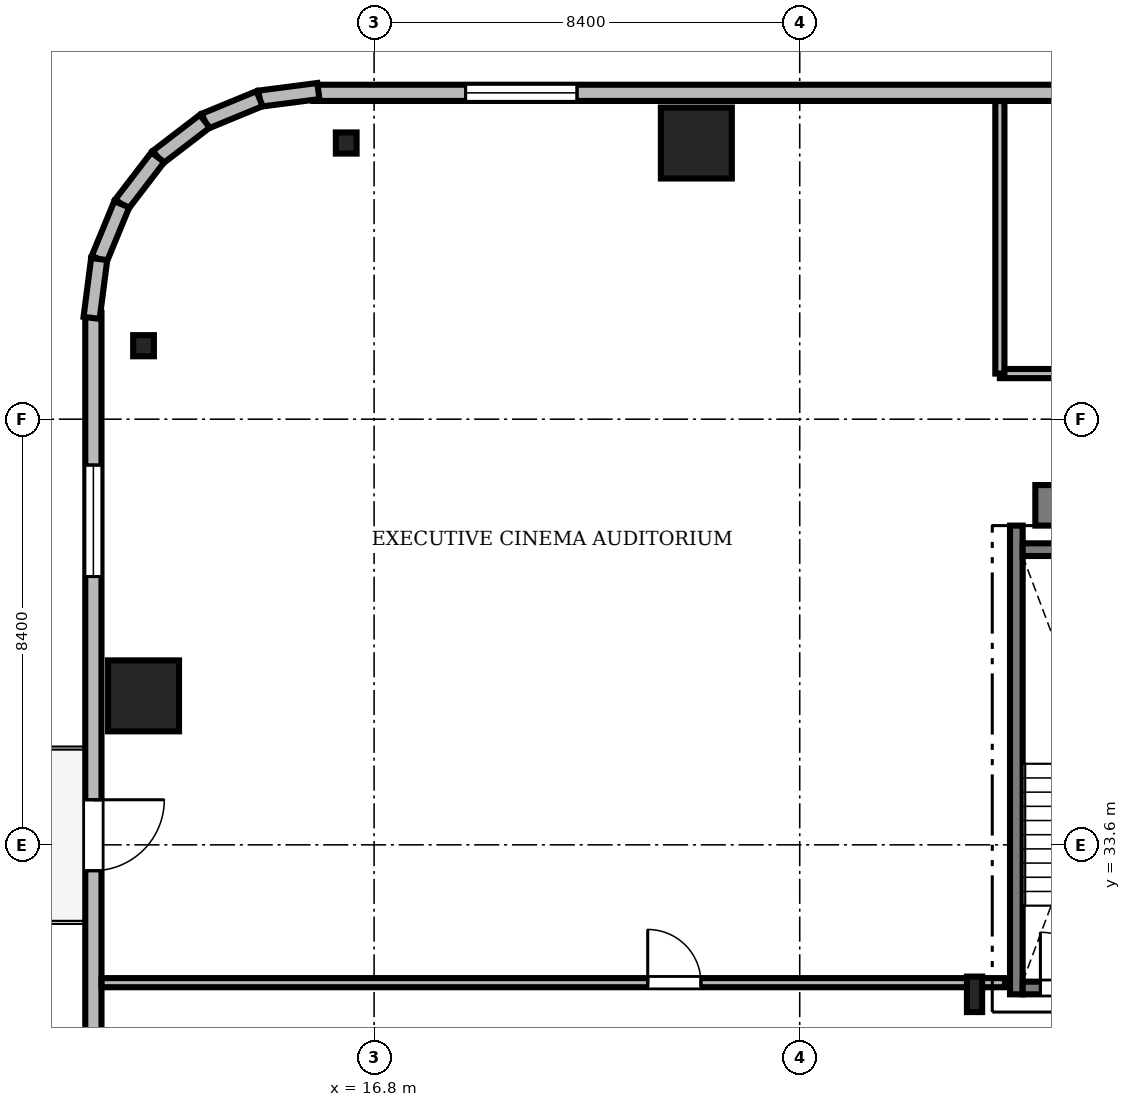
"""IFC4 building model, lengths in metres.
Left out: names, types, materials, properties, quantities, classifications, styles, units other than length and angle.
Written with IfcOpenShell. Run it as: python <this file> out.ifc"""

import sys

from ifc_helpers import new_model, si_unit, direction, frame, frame_2d, origin, origin_2d, place, context, subcontext, project, spatial, rectangle, i_section, extrude, source, transform, mapped, element, fill, save


model = new_model("IFC4")
c1 = context("Model", 3, precision=1e-05, world=origin(), true_north=direction((0.0, 1.0)))
c2 = subcontext(c1, "Body", "Model", "MODEL_VIEW")
j1 = project(units=[si_unit("LENGTHUNIT", "METRE"), si_unit("PLANEANGLEUNIT", "RADIAN")], contexts=[c1])
p1 = place(None, origin())
s1 = spatial("IfcSite", under=j1, at=p1, CompositionType="ELEMENT")
p2 = place(p1, origin())
s2 = spatial("IfcBuilding", under=s1, at=p2, CompositionType="ELEMENT")
p3 = place(p2, frame((0.0, 0.0, 184.8)))
s3 = spatial("IfcBuildingStorey", under=s2, at=p3, CompositionType="ELEMENT", Elevation=184.8)
m1 = source(origin(), c2, "Body", "SweptSolid", [
    extrude(rectangle(XDim=17.52, YDim=0.8, at=frame_2d((8.76, 0.0))), origin(), (0.0, 0.0, 1.0), 3.53),
])
p4 = place(p3, frame((29.85, 40.3, 0.0), z_axis=(0.0, 0.0, 1.0), x_axis=(1.0, 0.0, 0.0)))
e1 = element("IfcWall", 1, at=p4, inside=s3, PredefinedType="SHEAR", context=c2, shape_type="MappedRepresentation", body=[
    mapped(m1, transform((0.0, 0.0, 0.0), scale=1.0)),
])
m2 = source(origin(), c2, "Body", "SweptSolid", [
    extrude(i_section(OverallWidth=0.3, OverallDepth=0.7, WebThickness=0.017, FlangeThickness=0.032, FilletRadius=0.027, at=origin_2d()), origin(), (0.0, 0.0, 1.0), 3.53),
])
p5 = place(p3, frame((28.65, 30.65, 0.0), z_axis=(0.0, 0.0, 1.0), x_axis=(1.0, 0.0, 0.0)))
e2 = element("IfcColumn", 2, at=p5, inside=s3, PredefinedType="COLUMN", context=c2, shape_type="MappedRepresentation", body=[
    mapped(m2, transform((0.0, 0.0, 0.0), scale=1.0)),
])
m3 = source(origin(), c2, "Body", "SweptSolid", [
    extrude(rectangle(XDim=1.4, YDim=1.4, at=origin_2d()), origin(), (0.0, 0.0, 1.0), 3.53),
])
for number, where, z_axis, x_axis in (
    (3, (23.16, 47.45, 0.0), (0.0, 0.0, 1.0), (1.0, 0.0, 0.0)),
    (4, (12.25, 36.54, 0.0), (0.0, 0.0, 1.0), (1.0, 0.0, 0.0)),
):
    element("IfcColumn", number, at=place(p3, frame(where, z_axis=z_axis, x_axis=x_axis)), inside=s3, PredefinedType="COLUMN", context=c2, shape_type="MappedRepresentation", body=[
        mapped(m3, transform((0.0, 0.0, 0.0), scale=1.0)),
    ])
m4 = source(origin(), c2, "Body", "SweptSolid", [
    extrude(i_section(OverallWidth=0.409, OverallDepth=0.417, WebThickness=0.021, FlangeThickness=0.033, FilletRadius=0.015, at=origin_2d()), origin(), (0.0, 0.0, 1.0), 3.53),
])
for number, where, z_axis, x_axis in (
    (5, (16.25, 47.45, 0.0), (0.0, 0.0, 1.0), (1.0, 0.0, 0.0)),
    (6, (12.25, 43.45, 0.0), (0.0, 0.0, 1.0), (1.0, 0.0, 0.0)),
):
    element("IfcColumn", number, at=place(p3, frame(where, z_axis=z_axis, x_axis=x_axis)), inside=s3, PredefinedType="COLUMN", context=c2, shape_type="MappedRepresentation", body=[
        mapped(m4, transform((0.0, 0.0, 0.0), scale=1.0)),
    ])
m5 = source(origin(), c2, "Body", "SweptSolid", [
    extrude(rectangle(XDim=15.6, YDim=0.32, at=frame_2d((7.8, 0.0))), origin(), (0.0, 0.0, 1.0), 3.53),
])
p6 = place(p3, frame((31.2, 48.44, 0.0), z_axis=(0.0, 0.0, 1.0), x_axis=(-1.0, 0.0, 0.0)))
e7 = element("IfcWall", 7, at=p6, inside=s3, PredefinedType="SOLIDWALL", context=c2, shape_type="MappedRepresentation", body=[
    mapped(m5, transform((0.0, 0.0, 0.0), scale=1.0)),
])
m6 = source(origin(), c2, "Body", "SweptSolid", [
    extrude(rectangle(XDim=2.2, YDim=2.4, at=frame_2d((1.1, 1.2))), frame((0.0, 0.17, 0.0), z_axis=(0.0, -1.0, 0.0), x_axis=(1.0, 0.0, 0.0)), (0.0, 0.0, 1.0), 0.34),
])
p7 = place(p6, frame((10.395, 0.0, 0.72)))
e8 = element("IfcOpeningElement", 8, at=p7, cuts=e7, PredefinedType="OPENING", context=c2, shape_type="MappedRepresentation", body=[
    mapped(m6, transform((0.0, 0.0, 0.0), scale=1.0)),
])
m7 = source(origin(), c2, "Body", "SweptSolid", [
    extrude(rectangle(XDim=15.6, YDim=0.32, at=frame_2d((7.8, 0.0))), origin(), (0.0, 0.0, 1.0), 3.53),
])
p8 = place(p3, frame((11.26, 44.1, 0.0), z_axis=(0.0, 0.0, 1.0), x_axis=(0.0, -1.0, 0.0)))
e9 = element("IfcWall", 9, at=p8, inside=s3, PredefinedType="SOLIDWALL", context=c2, shape_type="MappedRepresentation", body=[
    mapped(m7, transform((0.0, 0.0, 0.0), scale=1.0)),
])
m8 = source(origin(), c2, "Body", "SweptSolid", [
    extrude(rectangle(XDim=1.4, YDim=2.3, at=frame_2d((0.7, 1.15))), frame((0.0, 0.17, 0.0), z_axis=(0.0, -1.0, 0.0), x_axis=(1.0, 0.0, 0.0)), (0.0, 0.0, 1.0), 0.34),
])
p9 = place(p8, frame((9.61, 0.0, 0.0)))
e10 = element("IfcOpeningElement", 10, at=p9, cuts=e9, PredefinedType="OPENING", context=c2, shape_type="MappedRepresentation", body=[
    mapped(m8, transform((0.0, 0.0, 0.0), scale=1.0)),
])
p10 = place(p8, frame((3.005, 0.0, 0.72)))
e11 = element("IfcOpeningElement", 11, at=p10, cuts=e9, PredefinedType="OPENING", context=c2, shape_type="MappedRepresentation", body=[
    mapped(m6, transform((0.0, 0.0, 0.0), scale=1.0)),
])
m9 = source(origin(), c2, "Body", "SweptSolid", [
    extrude(rectangle(XDim=1.17, YDim=0.32, at=frame_2d((0.585, 0.0))), origin(), (0.0, 0.0, 1.0), 3.53),
])
p11 = place(p3, frame((15.7, 48.476, 0.0), z_axis=(0.0, 0.0, 1.0), x_axis=(-0.991735963317, -0.128295670475, 0.0)))
e12 = element("IfcWall", 12, at=p11, inside=s3, PredefinedType="SOLIDWALL", context=c2, shape_type="MappedRepresentation", body=[
    mapped(m9, transform((0.0, 0.0, 0.0), scale=1.0)),
])
m10 = source(origin(), c2, "Body", "SweptSolid", [
    extrude(rectangle(XDim=1.169, YDim=0.32, at=frame_2d((0.584, 0.0))), origin(), (0.0, 0.0, 1.0), 3.53),
])
p12 = place(p3, frame((14.54, 48.325, 0.0), z_axis=(0.0, 0.0, 1.0), x_axis=(-0.924552646638, -0.381054331552, 0.0)))
e13 = element("IfcWall", 13, at=p12, inside=s3, PredefinedType="SOLIDWALL", context=c2, shape_type="MappedRepresentation", body=[
    mapped(m10, transform((0.0, 0.0, 0.0), scale=1.0)),
])
m11 = source(origin(), c2, "Body", "SweptSolid", [
    extrude(rectangle(XDim=1.169, YDim=0.32, at=frame_2d((0.584, 0.0))), origin(), (0.0, 0.0, 1.0), 3.53),
])
p13 = place(p3, frame((13.459, 47.88, 0.0), z_axis=(0.0, 0.0, 1.0), x_axis=(-0.793663520347, -0.608356981114, 0.0)))
e14 = element("IfcWall", 14, at=p13, inside=s3, PredefinedType="SOLIDWALL", context=c2, shape_type="MappedRepresentation", body=[
    mapped(m11, transform((0.0, 0.0, 0.0), scale=1.0)),
])
m12 = source(origin(), c2, "Body", "SweptSolid", [
    extrude(rectangle(XDim=1.169, YDim=0.32, at=frame_2d((0.584, 0.0))), origin(), (0.0, 0.0, 1.0), 3.53),
])
p14 = place(p3, frame((12.531, 47.169, 0.0), z_axis=(0.0, 0.0, 1.0), x_axis=(-0.608387696831, -0.793639975269, 0.0)))
e15 = element("IfcWall", 15, at=p14, inside=s3, PredefinedType="SOLIDWALL", context=c2, shape_type="MappedRepresentation", body=[
    mapped(m12, transform((0.0, 0.0, 0.0), scale=1.0)),
])
p15 = place(p3, frame((11.82, 46.241, 0.0), z_axis=(0.0, 0.0, 1.0), x_axis=(-0.381054331552, -0.924552646638, 0.0)))
e16 = element("IfcWall", 16, at=p15, inside=s3, PredefinedType="SOLIDWALL", context=c2, shape_type="MappedRepresentation", body=[
    mapped(m10, transform((0.0, 0.0, 0.0), scale=1.0)),
])
p16 = place(p3, frame((11.375, 45.16, 0.0), z_axis=(0.0, 0.0, 1.0), x_axis=(-0.128295670475, -0.991735963317, 0.0)))
e17 = element("IfcWall", 17, at=p16, inside=s3, PredefinedType="SOLIDWALL", context=c2, shape_type="MappedRepresentation", body=[
    mapped(m9, transform((0.0, 0.0, 0.0), scale=1.0)),
])
m13 = source(origin(), c2, "Body", "SweptSolid", [
    extrude(rectangle(XDim=9.25, YDim=0.25, at=frame_2d((4.625, 0.0))), origin(), (0.0, 0.0, 1.0), 3.55),
])
p17 = place(p3, frame((29.475, 30.65, 0.0), z_axis=(0.0, 0.0, 1.0), x_axis=(0.0, 1.0, 0.0)))
e18 = element("IfcWall", 18, at=p17, inside=s3, PredefinedType="SOLIDWALL", context=c2, shape_type="MappedRepresentation", body=[
    mapped(m13, transform((0.0, 0.0, 0.0), scale=1.0)),
])
m14 = source(origin(), c2, "Body", "SweptSolid", [
    extrude(rectangle(XDim=3.15, YDim=0.25, at=frame_2d((1.575, 0.0))), origin(), (0.0, 0.0, 1.0), 3.55),
])
p18 = place(p3, frame((29.6, 39.425, 0.0), z_axis=(0.0, 0.0, 1.0), x_axis=(1.0, 0.0, 0.0)))
e19 = element("IfcWall", 19, at=p18, inside=s3, PredefinedType="SOLIDWALL", context=c2, shape_type="MappedRepresentation", body=[
    mapped(m14, transform((0.0, 0.0, 0.0), scale=1.0)),
])
p19 = place(p3, frame((29.6, 30.775, 0.0), z_axis=(0.0, 0.0, 1.0), x_axis=(1.0, 0.0, 0.0)))
e20 = element("IfcWall", 20, at=p19, inside=s3, PredefinedType="SOLIDWALL", context=c2, shape_type="MappedRepresentation", body=[
    mapped(m14, transform((0.0, 0.0, 0.0), scale=1.0)),
])
m15 = source(origin(), c2, "Body", "SweptSolid", [
    extrude(rectangle(XDim=1.1, YDim=2.2, at=frame_2d((0.55, 1.1))), frame((0.0, 0.135, 0.0), z_axis=(0.0, -1.0, 0.0), x_axis=(1.0, 0.0, 0.0)), (0.0, 0.0, 1.0), 0.27),
])
p20 = place(p19, frame((0.35, 0.0, 0.0)))
e21 = element("IfcOpeningElement", 21, at=p20, cuts=e20, PredefinedType="OPENING", context=c2, shape_type="MappedRepresentation", body=[
    mapped(m15, transform((0.0, 0.0, 0.0), scale=1.0)),
])
m16 = source(origin(), c2, "Body", "SweptSolid", [
    extrude(rectangle(XDim=28.428, YDim=0.18, at=frame_2d((14.214, 0.0))), origin(), (0.0, 0.0, 1.0), 2.772),
])
p21 = place(p3, frame((29.15, 42.9, 0.0), z_axis=(0.0, 0.0, 1.0), x_axis=(1.0, 0.0, 0.0)))
e22 = element("IfcWall", 22, at=p21, inside=s3, PredefinedType="PARTITIONING", context=c2, shape_type="MappedRepresentation", body=[
    mapped(m16, transform((0.0, 0.0, 0.0), scale=1.0)),
])
m17 = source(origin(), c2, "Body", "SweptSolid", [
    extrude(rectangle(XDim=1.05, YDim=2.2, at=frame_2d((0.525, 1.1))), frame((0.0, 0.1, 0.0), z_axis=(0.0, -1.0, 0.0), x_axis=(1.0, 0.0, 0.0)), (0.0, 0.0, 1.0), 0.2),
])
p22 = place(p21, frame((4.5, 0.0, 0.0)))
e23 = element("IfcOpeningElement", 23, at=p22, cuts=e22, PredefinedType="OPENING", context=c2, shape_type="MappedRepresentation", body=[
    mapped(m17, transform((0.0, 0.0, 0.0), scale=1.0)),
])
m18 = source(origin(), c2, "Body", "SweptSolid", [
    extrude(rectangle(XDim=17.828, YDim=0.18, at=frame_2d((8.914, 0.0))), origin(), (0.0, 0.0, 1.0), 2.772),
])
p23 = place(p3, frame((11.422, 30.88, 0.0), z_axis=(0.0, 0.0, 1.0), x_axis=(1.0, 0.0, 0.0)))
e24 = element("IfcWall", 24, at=p23, inside=s3, PredefinedType="PARTITIONING", context=c2, shape_type="MappedRepresentation", body=[
    mapped(m18, transform((0.0, 0.0, 0.0), scale=1.0)),
])
p24 = place(p23, frame((10.778, 0.0, 0.0)))
e25 = element("IfcOpeningElement", 25, at=p24, cuts=e24, PredefinedType="OPENING", context=c2, shape_type="MappedRepresentation", body=[
    mapped(m17, transform((0.0, 0.0, 0.0), scale=1.0)),
])
m19 = source(origin(), c2, "Body", "SweptSolid", [
    extrude(rectangle(XDim=5.378, YDim=0.18, at=frame_2d((2.689, 0.0))), origin(), (0.0, 0.0, 1.0), 2.772),
])
p25 = place(p3, frame((29.15, 42.9, 0.0), z_axis=(0.0, 0.0, 1.0), x_axis=(0.0, 1.0, 0.0)))
e26 = element("IfcWall", 26, at=p25, inside=s3, PredefinedType="PARTITIONING", context=c2, shape_type="MappedRepresentation", body=[
    mapped(m19, transform((0.0, 0.0, 0.0), scale=1.0)),
])
m20 = source(origin(), c2, "Body", "SweptSolid", [
    extrude(rectangle(XDim=2.2, YDim=2.4, at=frame_2d((1.1, 1.2))), frame((0.0, 0.03, 0.0), z_axis=(0.0, -1.0, 0.0), x_axis=(1.0, 0.0, 0.0)), (0.0, 0.0, 1.0), 0.06),
])
p26 = place(p7, origin())
e27 = element("IfcWindow", 27, at=p26, inside=s3, PartitioningType="SINGLE_PANEL", PredefinedType="WINDOW", context=c2, shape_type="MappedRepresentation", body=[
    mapped(m20, transform((0.0, 0.0, 0.0), scale=1.0)),
])
fill(e8, e27)
m21 = source(origin(), c2, "Body", "SweptSolid", [
    extrude(rectangle(XDim=1.4, YDim=2.3, at=frame_2d((0.7, 1.15))), frame((0.0, 0.025, 0.0), z_axis=(0.0, -1.0, 0.0), x_axis=(1.0, 0.0, 0.0)), (0.0, 0.0, 1.0), 0.05),
])
p27 = place(p9, frame((1.4, 0.0, 0.0), z_axis=(0.0, 0.0, 1.0), x_axis=(-1.0, 0.0, 0.0)))
e28 = element("IfcDoor", 28, at=p27, inside=s3, OperationType="DOUBLE_DOOR_SLIDING", PredefinedType="DOOR", context=c2, shape_type="MappedRepresentation", body=[
    mapped(m21, transform((0.0, 0.0, 0.0), scale=1.0)),
])
fill(e10, e28)
p28 = place(p10, origin())
e29 = element("IfcWindow", 29, at=p28, inside=s3, PartitioningType="SINGLE_PANEL", PredefinedType="WINDOW", context=c2, shape_type="MappedRepresentation", body=[
    mapped(m20, transform((0.0, 0.0, 0.0), scale=1.0)),
])
fill(e11, e29)
m22 = source(origin(), c2, "Body", "SweptSolid", [
    extrude(rectangle(XDim=1.1, YDim=2.2, at=frame_2d((0.55, 1.1))), frame((0.0, 0.025, 0.0), z_axis=(0.0, -1.0, 0.0), x_axis=(1.0, 0.0, 0.0)), (0.0, 0.0, 1.0), 0.05),
])
p29 = place(p20, origin())
e30 = element("IfcDoor", 30, at=p29, inside=s3, OperationType="SINGLE_SWING_LEFT", PredefinedType="DOOR", context=c2, shape_type="MappedRepresentation", body=[
    mapped(m22, transform((0.0, 0.0, 0.0), scale=1.0)),
])
fill(e21, e30)
m23 = source(origin(), c2, "Body", "SweptSolid", [
    extrude(rectangle(XDim=1.05, YDim=2.2, at=frame_2d((0.525, 1.1))), frame((0.0, 0.025, 0.0), z_axis=(0.0, -1.0, 0.0), x_axis=(1.0, 0.0, 0.0)), (0.0, 0.0, 1.0), 0.05),
])
p30 = place(p24, origin())
e31 = element("IfcDoor", 31, at=p30, inside=s3, OperationType="SINGLE_SWING_LEFT", PredefinedType="DOOR", context=c2, shape_type="MappedRepresentation", body=[
    mapped(m23, transform((0.0, 0.0, 0.0), scale=1.0)),
])
fill(e25, e31)
save(model, sys.argv[1])
